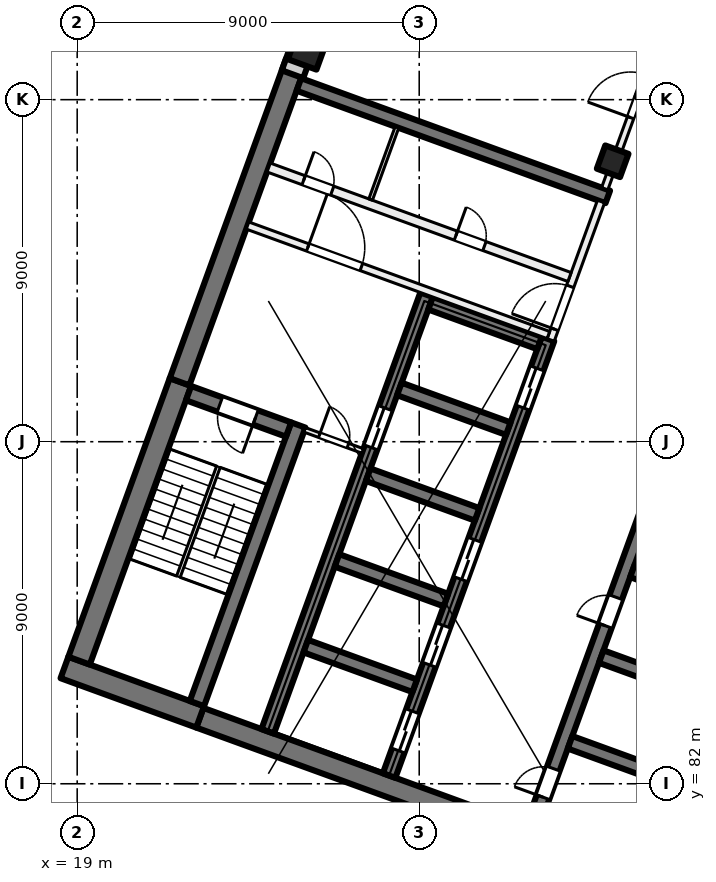
"""IFC4 building model, lengths in metres.
Left out: names, types, materials, properties, quantities, classifications, styles, units other than length and angle.
Written with IfcOpenShell. Run it as: python <this file> out.ifc"""

import sys

from ifc_helpers import new_model, si_unit, direction, frame, frame_2d, origin, origin_2d, place, context, subcontext, project, spatial, rectangle, extrude, element, fill, save


model = new_model("IFC4")
c1 = context("Model", 3, precision=1e-05, world=origin(), true_north=direction((0.0, 1.0)))
c2 = subcontext(c1, "Body", "Model", "MODEL_VIEW")
j1 = project(units=[si_unit("LENGTHUNIT", "METRE"), si_unit("PLANEANGLEUNIT", "RADIAN")], contexts=[c1])
p1 = place(None, origin())
s1 = spatial("IfcSite", under=j1, at=p1, CompositionType="ELEMENT")
p2 = place(p1, origin())
s2 = spatial("IfcBuilding", under=s1, at=p2, CompositionType="ELEMENT")
p3 = place(p2, frame((0.0, 0.0, 158.5)))
s3 = spatial("IfcBuildingStorey", under=s2, at=p3, CompositionType="ELEMENT", Elevation=158.5)
p4 = place(p3, frame((33.091, 98.379, 0.0), z_axis=(0.0, 0.0, 1.0), x_axis=(-0.342020143326, -0.939692620786, 0.0)))
e1 = element("IfcColumn", 1, at=p4, inside=s3, PredefinedType="COLUMN", context=c2, shape_type="SweptSolid", body=[
    extrude(rectangle(XDim=0.65, YDim=0.65, at=origin_2d()), origin(), (0.0, 0.0, 1.0), 4.0),
])
p5 = place(p3, frame((25.056, 101.303, 0.0), z_axis=(0.0, 0.0, 1.0), x_axis=(-0.342020143326, -0.939692620786, 0.0)))
e2 = element("IfcColumn", 2, at=p5, inside=s3, PredefinedType="COLUMN", context=c2, shape_type="SweptSolid", body=[
    extrude(rectangle(XDim=0.8, YDim=0.8, at=origin_2d()), origin(), (0.0, 0.0, 1.0), 4.0),
])
p6 = place(p3, frame((35.759, 78.811, 0.0), z_axis=(0.0, 0.0, 1.0), x_axis=(-0.939692894512, 0.342019391267, 0.0)))
e3 = element("IfcWall", 3, at=p6, inside=s3, PredefinedType="SHEAR", context=c2, shape_type="SweptSolid", body=[
    extrude(rectangle(XDim=14.4, YDim=0.55, at=frame_2d((7.2, 0.0))), origin(), (0.0, 0.0, 1.0), 4.0),
])
p7 = place(p3, frame((22.236, 83.76, 0.0), z_axis=(0.0, 0.0, 1.0), x_axis=(-0.939680822529, 0.342052557032, 0.0)))
e4 = element("IfcWall", 4, at=p7, inside=s3, PredefinedType="SHEAR", context=c2, shape_type="SweptSolid", body=[
    extrude(rectangle(XDim=3.8, YDim=0.6, at=frame_2d((1.9, 0.0))), origin(), (0.0, 0.0, 1.0), 4.0),
])
p8 = place(p3, frame((19.05, 85.239, 0.0), z_axis=(0.0, 0.0, 1.0), x_axis=(0.342016982193, 0.939693771338, 0.0)))
e5 = element("IfcWall", 5, at=p8, inside=s3, PredefinedType="SHEAR", context=c2, shape_type="SweptSolid", body=[
    extrude(rectangle(XDim=7.8, YDim=0.6, at=frame_2d((3.9, 0.0))), origin(), (0.0, 0.0, 1.0), 4.0),
])
p9 = place(p3, frame((21.694, 92.577, 0.0), z_axis=(0.0, 0.0, 1.0), x_axis=(0.342010253184, 0.939696220444, 0.0)))
e6 = element("IfcWall", 6, at=p9, inside=s3, PredefinedType="SHEAR", context=c2, shape_type="SweptSolid", body=[
    extrude(rectangle(XDim=8.95, YDim=0.55, at=frame_2d((4.475, 0.0))), origin(), (0.0, 0.0, 1.0), 4.0),
])
p10 = place(p3, frame((22.15, 84.11, 0.0), z_axis=(0.0, 0.0, 1.0), x_axis=(0.342016982193, 0.939693771338, 0.0)))
e7 = element("IfcWall", 7, at=p10, inside=s3, PredefinedType="SHEAR", context=c2, shape_type="SweptSolid", body=[
    extrude(rectangle(XDim=7.8, YDim=0.4, at=frame_2d((3.9, 0.0))), origin(), (0.0, 0.0, 1.0), 4.0),
])
p11 = place(p3, frame((24.562, 91.32, 0.0), z_axis=(0.0, 0.0, 1.0), x_axis=(-0.939717030584, 0.341953070509, 0.0)))
e8 = element("IfcWall", 8, at=p11, inside=s3, PredefinedType="SHEAR", context=c2, shape_type="SweptSolid", body=[
    extrude(rectangle(XDim=2.8, YDim=0.4, at=frame_2d((1.4, 0.0))), origin(), (0.0, 0.0, 1.0), 4.0),
])
p12 = place(p11, frame((0.925, 0.0, 0.0)))
e9 = element("IfcOpeningElement", 9, at=p12, cuts=e8, PredefinedType="OPENING", context=c2, shape_type="SweptSolid", body=[
    extrude(rectangle(XDim=1.0, YDim=2.1, at=frame_2d((0.5, 1.05))), frame((0.0, 0.21, 0.0), z_axis=(0.0, -1.0, 0.0), x_axis=(1.0, 0.0, 0.0)), (0.0, 0.0, 1.0), 0.42),
])
p13 = place(p3, frame((30.967, 80.848, 0.0), z_axis=(0.0, 0.0, 1.0), x_axis=(0.34201563943, 0.939694260058, 0.0)))
e10 = element("IfcWall", 10, at=p13, inside=s3, PredefinedType="SHEAR", context=c2, shape_type="SweptSolid", body=[
    extrude(rectangle(XDim=12.225, YDim=0.35, at=frame_2d((6.113, 0.0))), origin(), (0.0, 0.0, 1.0), 4.0),
])
p14 = place(p13, frame((0.85, 0.0, 0.0)))
e11 = element("IfcOpeningElement", 11, at=p14, cuts=e10, PredefinedType="OPENING", context=c2, shape_type="SweptSolid", body=[
    extrude(rectangle(XDim=0.8, YDim=2.1, at=frame_2d((0.4, 1.05))), frame((0.0, 0.185, 0.0), z_axis=(0.0, -1.0, 0.0), x_axis=(1.0, 0.0, 0.0)), (0.0, 0.0, 1.0), 0.37),
])
p15 = place(p13, frame((5.65, 0.0, 0.0)))
e12 = element("IfcOpeningElement", 12, at=p15, cuts=e10, PredefinedType="OPENING", context=c2, shape_type="SweptSolid", body=[
    extrude(rectangle(XDim=0.8, YDim=2.1, at=frame_2d((0.4, 1.05))), frame((0.0, 0.185, 0.0), z_axis=(0.0, -1.0, 0.0), x_axis=(1.0, 0.0, 0.0)), (0.0, 0.0, 1.0), 0.37),
])
p16 = place(p3, frame((34.835, 82.047, 0.0), z_axis=(0.0, 0.0, 1.0), x_axis=(-0.939683528043, 0.3420451244, 0.0)))
e13 = element("IfcWall", 13, at=p16, inside=s3, PredefinedType="SHEAR", context=c2, shape_type="SweptSolid", body=[
    extrude(rectangle(XDim=3.05, YDim=0.35, at=frame_2d((1.525, 0.0))), origin(), (0.0, 0.0, 1.0), 4.0),
])
p17 = place(p3, frame((35.656, 84.303, 0.0), z_axis=(0.0, 0.0, 1.0), x_axis=(-0.939709254651, 0.341974438698, 0.0)))
e14 = element("IfcWall", 14, at=p17, inside=s3, PredefinedType="SHEAR", context=c2, shape_type="SweptSolid", body=[
    extrude(rectangle(XDim=3.05, YDim=0.35, at=frame_2d((1.525, 0.0))), origin(), (0.0, 0.0, 1.0), 4.0),
])
p18 = place(p3, frame((36.477, 86.558, 0.0), z_axis=(0.0, 0.0, 1.0), x_axis=(-0.939683528043, 0.3420451244, 0.0)))
e15 = element("IfcWall", 15, at=p18, inside=s3, PredefinedType="SHEAR", context=c2, shape_type="SweptSolid", body=[
    extrude(rectangle(XDim=3.05, YDim=0.35, at=frame_2d((1.525, 0.0))), origin(), (0.0, 0.0, 1.0), 4.0),
])
p19 = place(p3, frame((27.208, 82.216, 0.0), z_axis=(0.0, 0.0, 1.0), x_axis=(0.34201563943, 0.939694260058, 0.0)))
e16 = element("IfcWall", 16, at=p19, inside=s3, PredefinedType="SHEAR", context=c2, shape_type="SweptSolid", body=[
    extrude(rectangle(XDim=12.225, YDim=0.35, at=frame_2d((6.113, 0.0))), origin(), (0.0, 0.0, 1.0), 4.0),
])
p20 = place(p19, frame((0.7, 0.0, 0.0)))
e17 = element("IfcOpeningElement", 17, at=p20, cuts=e16, PredefinedType="OPENING", context=c2, shape_type="SweptSolid", body=[
    extrude(rectangle(XDim=1.1, YDim=2.1, at=frame_2d((0.55, 1.05))), frame((0.0, 0.185, 0.0), z_axis=(0.0, -1.0, 0.0), x_axis=(1.0, 0.0, 0.0)), (0.0, 0.0, 1.0), 0.37),
])
p21 = place(p19, frame((3.1, 0.0, 0.0)))
e18 = element("IfcOpeningElement", 18, at=p21, cuts=e16, PredefinedType="OPENING", context=c2, shape_type="SweptSolid", body=[
    extrude(rectangle(XDim=1.1, YDim=2.1, at=frame_2d((0.55, 1.05))), frame((0.0, 0.185, 0.0), z_axis=(0.0, -1.0, 0.0), x_axis=(1.0, 0.0, 0.0)), (0.0, 0.0, 1.0), 0.37),
])
p22 = place(p19, frame((5.5, 0.0, 0.0)))
e19 = element("IfcOpeningElement", 19, at=p22, cuts=e16, PredefinedType="OPENING", context=c2, shape_type="SweptSolid", body=[
    extrude(rectangle(XDim=1.1, YDim=2.1, at=frame_2d((0.55, 1.05))), frame((0.0, 0.185, 0.0), z_axis=(0.0, -1.0, 0.0), x_axis=(1.0, 0.0, 0.0)), (0.0, 0.0, 1.0), 0.37),
])
p23 = place(p19, frame((10.3, 0.0, 0.0)))
e20 = element("IfcOpeningElement", 20, at=p23, cuts=e16, PredefinedType="OPENING", context=c2, shape_type="SweptSolid", body=[
    extrude(rectangle(XDim=1.1, YDim=2.1, at=frame_2d((0.55, 1.05))), frame((0.0, 0.185, 0.0), z_axis=(0.0, -1.0, 0.0), x_axis=(1.0, 0.0, 0.0)), (0.0, 0.0, 1.0), 0.37),
])
p24 = place(p3, frame((24.013, 83.379, 0.0), z_axis=(0.0, 0.0, 1.0), x_axis=(0.34201563943, 0.939694260058, 0.0)))
e21 = element("IfcWall", 21, at=p24, inside=s3, PredefinedType="SHEAR", context=c2, shape_type="SweptSolid", body=[
    extrude(rectangle(XDim=12.225, YDim=0.35, at=frame_2d((6.113, 0.0))), origin(), (0.0, 0.0, 1.0), 4.0),
])
p25 = place(p24, frame((7.95, 0.0, 0.0)))
e22 = element("IfcOpeningElement", 22, at=p25, cuts=e21, PredefinedType="OPENING", context=c2, shape_type="SweptSolid", body=[
    extrude(rectangle(XDim=1.1, YDim=2.1, at=frame_2d((0.55, 1.05))), frame((0.0, 0.185, 0.0), z_axis=(0.0, -1.0, 0.0), x_axis=(1.0, 0.0, 0.0)), (0.0, 0.0, 1.0), 0.37),
])
for number, where, z_axis, x_axis in (
    (23, (27.881, 84.578, 0.0), (0.0, 0.0, 1.0), (-0.94, 0.342, 0.0)),
    (24, (28.702, 86.833, 0.0), (0.0, 0.0, 1.0), (-0.94, 0.342, 0.0)),
    (25, (29.523, 89.089, 0.0), (0.0, 0.0, 1.0), (-0.94, 0.342, 0.0)),
):
    element("IfcWall", number, at=place(p3, frame(where, z_axis=z_axis, x_axis=x_axis)), inside=s3, PredefinedType="SHEAR", context=c2, shape_type="SweptSolid", body=[
        extrude(rectangle(XDim=3.05, YDim=0.35, at=frame_2d((1.525, 0.0))), origin(), (0.0, 0.0, 1.0), 4.0),
    ])
p26 = place(p3, frame((30.344, 91.344, 0.0), z_axis=(0.0, 0.0, 1.0), x_axis=(-0.939709254651, 0.341974438698, 0.0)))
e26 = element("IfcWall", 26, at=p26, inside=s3, PredefinedType="SHEAR", context=c2, shape_type="SweptSolid", body=[
    extrude(rectangle(XDim=3.05, YDim=0.35, at=frame_2d((1.525, 0.0))), origin(), (0.0, 0.0, 1.0), 4.0),
])
p27 = place(p3, frame((31.165, 93.599, 0.0), z_axis=(0.0, 0.0, 1.0), x_axis=(-0.939683528043, 0.3420451244, 0.0)))
e27 = element("IfcWall", 27, at=p27, inside=s3, PredefinedType="SHEAR", context=c2, shape_type="SweptSolid", body=[
    extrude(rectangle(XDim=3.05, YDim=0.35, at=frame_2d((1.525, 0.0))), origin(), (0.0, 0.0, 1.0), 4.0),
])
p28 = place(p3, frame((32.962, 97.441, 0.0), z_axis=(0.0, 0.0, 1.0), x_axis=(-0.939689545667, 0.342028592028, 0.0)))
e28 = element("IfcWall", 28, at=p28, inside=s3, PredefinedType="SHEAR", context=c2, shape_type="SweptSolid", body=[
    extrude(rectangle(XDim=8.65, YDim=0.35, at=frame_2d((4.325, 0.0))), origin(), (0.0, 0.0, 1.0), 4.0),
])
p29 = place(p3, frame((24.666, 100.669, 0.0), z_axis=(0.0, 0.0, 1.0), x_axis=(0.34201964167, 0.939692803373, 0.0)))
e29 = element("IfcWall", 29, at=p29, inside=s3, PredefinedType="SOLIDWALL", context=c2, shape_type="SweptSolid", body=[
    extrude(rectangle(XDim=32.884, YDim=0.6, at=frame_2d((16.442, 0.0))), origin(), (0.0, 0.0, 1.0), 3.625),
])
p30 = place(p29, frame((1.48, 0.0, 0.9)))
e30 = element("IfcOpeningElement", 30, at=p30, cuts=e29, PredefinedType="OPENING", context=c2, shape_type="SweptSolid", body=[
    extrude(rectangle(XDim=3.0, YDim=2.4, at=frame_2d((1.5, 1.2))), frame((0.0, 0.31, 0.0), z_axis=(0.0, -1.0, 0.0), x_axis=(1.0, 0.0, 0.0)), (0.0, 0.0, 1.0), 0.62),
])
p31 = place(p29, frame((5.98, 0.0, 0.9)))
e31 = element("IfcOpeningElement", 31, at=p31, cuts=e29, PredefinedType="OPENING", context=c2, shape_type="SweptSolid", body=[
    extrude(rectangle(XDim=3.0, YDim=2.4, at=frame_2d((1.5, 1.2))), frame((0.0, 0.31, 0.0), z_axis=(0.0, -1.0, 0.0), x_axis=(1.0, 0.0, 0.0)), (0.0, 0.0, 1.0), 0.62),
])
p32 = place(p29, frame((10.48, 0.0, 0.9)))
e32 = element("IfcOpeningElement", 32, at=p32, cuts=e29, PredefinedType="OPENING", context=c2, shape_type="SweptSolid", body=[
    extrude(rectangle(XDim=3.0, YDim=2.4, at=frame_2d((1.5, 1.2))), frame((0.0, 0.31, 0.0), z_axis=(0.0, -1.0, 0.0), x_axis=(1.0, 0.0, 0.0)), (0.0, 0.0, 1.0), 0.62),
])
p33 = place(p29, frame((14.98, 0.0, 0.9)))
e33 = element("IfcOpeningElement", 33, at=p33, cuts=e29, PredefinedType="OPENING", context=c2, shape_type="SweptSolid", body=[
    extrude(rectangle(XDim=3.0, YDim=2.4, at=frame_2d((1.5, 1.2))), frame((0.0, 0.31, 0.0), z_axis=(0.0, -1.0, 0.0), x_axis=(1.0, 0.0, 0.0)), (0.0, 0.0, 1.0), 0.62),
])
p34 = place(p29, frame((19.48, 0.0, 0.9)))
e34 = element("IfcOpeningElement", 34, at=p34, cuts=e29, PredefinedType="OPENING", context=c2, shape_type="SweptSolid", body=[
    extrude(rectangle(XDim=3.0, YDim=2.4, at=frame_2d((1.5, 1.2))), frame((0.0, 0.31, 0.0), z_axis=(0.0, -1.0, 0.0), x_axis=(1.0, 0.0, 0.0)), (0.0, 0.0, 1.0), 0.62),
])
p35 = place(p29, frame((23.98, 0.0, 0.9)))
e35 = element("IfcOpeningElement", 35, at=p35, cuts=e29, PredefinedType="OPENING", context=c2, shape_type="SweptSolid", body=[
    extrude(rectangle(XDim=3.0, YDim=2.4, at=frame_2d((1.5, 1.2))), frame((0.0, 0.31, 0.0), z_axis=(0.0, -1.0, 0.0), x_axis=(1.0, 0.0, 0.0)), (0.0, 0.0, 1.0), 0.62),
])
p36 = place(p29, frame((28.48, 0.0, 0.9)))
e36 = element("IfcOpeningElement", 36, at=p36, cuts=e29, PredefinedType="OPENING", context=c2, shape_type="SweptSolid", body=[
    extrude(rectangle(XDim=3.0, YDim=2.4, at=frame_2d((1.5, 1.2))), frame((0.0, 0.31, 0.0), z_axis=(0.0, -1.0, 0.0), x_axis=(1.0, 0.0, 0.0)), (0.0, 0.0, 1.0), 0.62),
])
p37 = place(p3, frame((31.459, 93.678, 0.0), z_axis=(0.0, 0.0, 1.0), x_axis=(0.341985870128, 0.939705094502, 0.0)))
e37 = element("IfcWall", 37, at=p37, inside=s3, PredefinedType="PARTITIONING", context=c2, shape_type="SweptSolid", body=[
    extrude(rectangle(XDim=3.875, YDim=0.2, at=frame_2d((1.938, 0.0))), origin(), (0.0, 0.0, 1.0), 3.625),
])
p38 = place(p37, frame((0.3, 0.0, 0.0)))
e38 = element("IfcOpeningElement", 38, at=p38, cuts=e37, PredefinedType="OPENING", context=c2, shape_type="SweptSolid", body=[
    extrude(rectangle(XDim=1.2, YDim=2.1, at=frame_2d((0.6, 1.05))), frame((0.0, 0.11, 0.0), z_axis=(0.0, -1.0, 0.0), x_axis=(1.0, 0.0, 0.0)), (0.0, 0.0, 1.0), 0.22),
])
p39 = place(p3, frame((23.483, 96.688, 0.0), z_axis=(0.0, 0.0, 1.0), x_axis=(0.939691007314, -0.342024576271, 0.0)))
e39 = element("IfcWall", 39, at=p39, inside=s3, PredefinedType="PARTITIONING", context=c2, shape_type="SweptSolid", body=[
    extrude(rectangle(XDim=8.425, YDim=0.2, at=frame_2d((4.212, 0.0))), origin(), (0.0, 0.0, 1.0), 3.625),
])
p40 = place(p39, frame((1.688, 0.0, 0.0)))
e40 = element("IfcOpeningElement", 40, at=p40, cuts=e39, PredefinedType="OPENING", context=c2, shape_type="SweptSolid", body=[
    extrude(rectangle(XDim=1.5, YDim=2.1, at=frame_2d((0.75, 1.05))), frame((0.0, 0.11, 0.0), z_axis=(0.0, -1.0, 0.0), x_axis=(1.0, 0.0, 0.0)), (0.0, 0.0, 1.0), 0.22),
])
p41 = place(p3, frame((24.039, 98.215, 0.0), z_axis=(0.0, 0.0, 1.0), x_axis=(0.939687617333, -0.342033889887, 0.0)))
e41 = element("IfcWall", 41, at=p41, inside=s3, PredefinedType="PARTITIONING", context=c2, shape_type="SweptSolid", body=[
    extrude(rectangle(XDim=8.425, YDim=0.25, at=frame_2d((4.212, 0.0))), origin(), (0.0, 0.0, 1.0), 3.625),
])
p42 = place(p41, frame((5.242, 0.0, 0.0)))
e42 = element("IfcOpeningElement", 42, at=p42, cuts=e41, PredefinedType="OPENING", context=c2, shape_type="SweptSolid", body=[
    extrude(rectangle(XDim=0.8, YDim=2.1, at=frame_2d((0.4, 1.05))), frame((0.0, 0.135, 0.0), z_axis=(0.0, -1.0, 0.0), x_axis=(1.0, 0.0, 0.0)), (0.0, 0.0, 1.0), 0.27),
])
p43 = place(p41, frame((0.98, 0.0, 0.0)))
e43 = element("IfcOpeningElement", 43, at=p43, cuts=e41, PredefinedType="OPENING", context=c2, shape_type="SweptSolid", body=[
    extrude(rectangle(XDim=0.8, YDim=2.1, at=frame_2d((0.4, 1.05))), frame((0.0, 0.135, 0.0), z_axis=(0.0, -1.0, 0.0), x_axis=(1.0, 0.0, 0.0)), (0.0, 0.0, 1.0), 0.27),
])
p44 = place(p3, frame((24.985, 91.312, 0.0), z_axis=(0.0, 0.0, 1.0), x_axis=(0.939705651352, -0.341984340019, 0.0)))
e44 = element("IfcWall", 44, at=p44, inside=s3, PredefinedType="PARTITIONING", context=c2, shape_type="SweptSolid", body=[
    extrude(rectangle(XDim=1.625, YDim=0.125, at=frame_2d((0.812, 0.0))), origin(), (0.0, 0.0, 1.0), 3.625),
])
p45 = place(p44, frame((0.413, 0.0, 0.0)))
e45 = element("IfcOpeningElement", 45, at=p45, cuts=e44, PredefinedType="OPENING", context=c2, shape_type="SweptSolid", body=[
    extrude(rectangle(XDim=0.8, YDim=2.1, at=frame_2d((0.4, 1.05))), frame((0.0, 0.073, 0.0), z_axis=(0.0, -1.0, 0.0), x_axis=(1.0, 0.0, 0.0)), (0.0, 0.0, 1.0), 0.145),
])
p46 = place(p3, frame((26.722, 97.371, 0.0), z_axis=(0.0, 0.0, 1.0), x_axis=(0.342004391282, 0.939698353911, 0.0)))
e46 = element("IfcWall", 46, at=p46, inside=s3, PredefinedType="PARTITIONING", context=c2, shape_type="SweptSolid", body=[
    extrude(rectangle(XDim=2.025, YDim=0.1, at=frame_2d((1.013, 0.0))), origin(), (0.0, 0.0, 1.0), 3.625),
])
p47 = place(p3, frame((32.881, 97.657, 0.0), z_axis=(0.0, 0.0, 1.0), x_axis=(0.342058204353, 0.939678766832, 0.0)))
e47 = element("IfcWall", 47, at=p47, inside=s3, PredefinedType="PARTITIONING", context=c2, shape_type="SweptSolid", body=[
    extrude(rectangle(XDim=5.163, YDim=0.175, at=frame_2d((2.581, 0.0))), origin(), (0.0, 0.0, 1.0), 3.625),
])
p48 = place(p47, frame((1.991, 0.0, 0.0)))
e48 = element("IfcOpeningElement", 48, at=p48, cuts=e47, PredefinedType="OPENING", context=c2, shape_type="SweptSolid", body=[
    extrude(rectangle(XDim=1.2, YDim=2.1, at=frame_2d((0.6, 1.05))), frame((0.0, 0.097, 0.0), z_axis=(0.0, -1.0, 0.0), x_axis=(1.0, 0.0, 0.0)), (0.0, 0.0, 1.0), 0.195),
])
p49 = place(p20, origin())
e49 = element("IfcDoor", 49, at=p49, inside=s3, OperationType="DOUBLE_DOOR_SLIDING", PredefinedType="DOOR", context=c2, shape_type="SweptSolid", body=[
    extrude(rectangle(XDim=1.1, YDim=2.1, at=frame_2d((0.55, 1.05))), frame((0.0, 0.025, 0.0), z_axis=(0.0, -1.0, 0.0), x_axis=(1.0, 0.0, 0.0)), (0.0, 0.0, 1.0), 0.05),
])
fill(e17, e49)
p50 = place(p21, origin())
e50 = element("IfcDoor", 50, at=p50, inside=s3, OperationType="DOUBLE_DOOR_SLIDING", PredefinedType="DOOR", context=c2, shape_type="SweptSolid", body=[
    extrude(rectangle(XDim=1.1, YDim=2.1, at=frame_2d((0.55, 1.05))), frame((0.0, 0.025, 0.0), z_axis=(0.0, -1.0, 0.0), x_axis=(1.0, 0.0, 0.0)), (0.0, 0.0, 1.0), 0.05),
])
fill(e18, e50)
p51 = place(p22, origin())
e51 = element("IfcDoor", 51, at=p51, inside=s3, OperationType="DOUBLE_DOOR_SLIDING", PredefinedType="DOOR", context=c2, shape_type="SweptSolid", body=[
    extrude(rectangle(XDim=1.1, YDim=2.1, at=frame_2d((0.55, 1.05))), frame((0.0, 0.025, 0.0), z_axis=(0.0, -1.0, 0.0), x_axis=(1.0, 0.0, 0.0)), (0.0, 0.0, 1.0), 0.05),
])
fill(e19, e51)
p52 = place(p23, origin())
e52 = element("IfcDoor", 52, at=p52, inside=s3, OperationType="DOUBLE_DOOR_SLIDING", PredefinedType="DOOR", context=c2, shape_type="SweptSolid", body=[
    extrude(rectangle(XDim=1.1, YDim=2.1, at=frame_2d((0.55, 1.05))), frame((0.0, 0.025, 0.0), z_axis=(0.0, -1.0, 0.0), x_axis=(1.0, 0.0, 0.0)), (0.0, 0.0, 1.0), 0.05),
])
fill(e20, e52)
p53 = place(p14, origin())
e53 = element("IfcDoor", 53, at=p53, inside=s3, OperationType="SINGLE_SWING_LEFT", PredefinedType="DOOR", context=c2, shape_type="SweptSolid", body=[
    extrude(rectangle(XDim=0.8, YDim=2.1, at=frame_2d((0.4, 1.05))), frame((0.0, 0.025, 0.0), z_axis=(0.0, -1.0, 0.0), x_axis=(1.0, 0.0, 0.0)), (0.0, 0.0, 1.0), 0.05),
])
fill(e11, e53)
p54 = place(p15, origin())
e54 = element("IfcDoor", 54, at=p54, inside=s3, OperationType="SINGLE_SWING_RIGHT", PredefinedType="DOOR", context=c2, shape_type="SweptSolid", body=[
    extrude(rectangle(XDim=0.8, YDim=2.1, at=frame_2d((0.4, 1.05))), frame((0.0, 0.025, 0.0), z_axis=(0.0, -1.0, 0.0), x_axis=(1.0, 0.0, 0.0)), (0.0, 0.0, 1.0), 0.05),
])
fill(e12, e54)
p55 = place(p38, origin())
e55 = element("IfcDoor", 55, at=p55, inside=s3, OperationType="DOUBLE_DOOR_SINGLE_SWING", PredefinedType="DOOR", context=c2, shape_type="SweptSolid", body=[
    extrude(rectangle(XDim=1.2, YDim=2.1, at=frame_2d((0.6, 1.05))), frame((0.0, 0.025, 0.0), z_axis=(0.0, -1.0, 0.0), x_axis=(1.0, 0.0, 0.0)), (0.0, 0.0, 1.0), 0.05),
])
fill(e38, e55)
p56 = place(p40, origin())
e56 = element("IfcDoor", 56, at=p56, inside=s3, OperationType="DOUBLE_DOOR_SINGLE_SWING", PredefinedType="DOOR", context=c2, shape_type="SweptSolid", body=[
    extrude(rectangle(XDim=1.5, YDim=2.1, at=frame_2d((0.75, 1.05))), frame((0.0, 0.025, 0.0), z_axis=(0.0, -1.0, 0.0), x_axis=(1.0, 0.0, 0.0)), (0.0, 0.0, 1.0), 0.05),
])
fill(e40, e56)
p57 = place(p12, origin())
e57 = element("IfcDoor", 57, at=p57, inside=s3, OperationType="SINGLE_SWING_LEFT", PredefinedType="DOOR", context=c2, shape_type="SweptSolid", body=[
    extrude(rectangle(XDim=1.0, YDim=2.1, at=frame_2d((0.5, 1.05))), frame((0.0, 0.025, 0.0), z_axis=(0.0, -1.0, 0.0), x_axis=(1.0, 0.0, 0.0)), (0.0, 0.0, 1.0), 0.05),
])
fill(e9, e57)
p58 = place(p45, origin())
e58 = element("IfcDoor", 58, at=p58, inside=s3, OperationType="SINGLE_SWING_RIGHT", PredefinedType="DOOR", context=c2, shape_type="SweptSolid", body=[
    extrude(rectangle(XDim=0.8, YDim=2.1, at=frame_2d((0.4, 1.05))), frame((0.0, 0.025, 0.0), z_axis=(0.0, -1.0, 0.0), x_axis=(1.0, 0.0, 0.0)), (0.0, 0.0, 1.0), 0.05),
])
fill(e45, e58)
p59 = place(p42, origin())
e59 = element("IfcDoor", 59, at=p59, inside=s3, OperationType="SINGLE_SWING_LEFT", PredefinedType="DOOR", context=c2, shape_type="SweptSolid", body=[
    extrude(rectangle(XDim=0.8, YDim=2.1, at=frame_2d((0.4, 1.05))), frame((0.0, 0.025, 0.0), z_axis=(0.0, -1.0, 0.0), x_axis=(1.0, 0.0, 0.0)), (0.0, 0.0, 1.0), 0.05),
])
fill(e42, e59)
p60 = place(p43, origin())
e60 = element("IfcDoor", 60, at=p60, inside=s3, OperationType="SINGLE_SWING_RIGHT", PredefinedType="DOOR", context=c2, shape_type="SweptSolid", body=[
    extrude(rectangle(XDim=0.8, YDim=2.1, at=frame_2d((0.4, 1.05))), frame((0.0, 0.025, 0.0), z_axis=(0.0, -1.0, 0.0), x_axis=(1.0, 0.0, 0.0)), (0.0, 0.0, 1.0), 0.05),
])
fill(e43, e60)
p61 = place(p25, origin())
e61 = element("IfcDoor", 61, at=p61, inside=s3, OperationType="DOUBLE_DOOR_SLIDING", PredefinedType="DOOR", context=c2, shape_type="SweptSolid", body=[
    extrude(rectangle(XDim=1.1, YDim=2.1, at=frame_2d((0.55, 1.05))), frame((0.0, 0.025, 0.0), z_axis=(0.0, -1.0, 0.0), x_axis=(1.0, 0.0, 0.0)), (0.0, 0.0, 1.0), 0.05),
])
fill(e22, e61)
p62 = place(p48, origin())
e62 = element("IfcDoor", 62, at=p62, inside=s3, OperationType="DOUBLE_DOOR_SINGLE_SWING", PredefinedType="DOOR", context=c2, shape_type="SweptSolid", body=[
    extrude(rectangle(XDim=1.2, YDim=2.1, at=frame_2d((0.6, 1.05))), frame((0.0, 0.025, 0.0), z_axis=(0.0, -1.0, 0.0), x_axis=(1.0, 0.0, 0.0)), (0.0, 0.0, 1.0), 0.05),
])
fill(e48, e62)
save(model, sys.argv[1])
